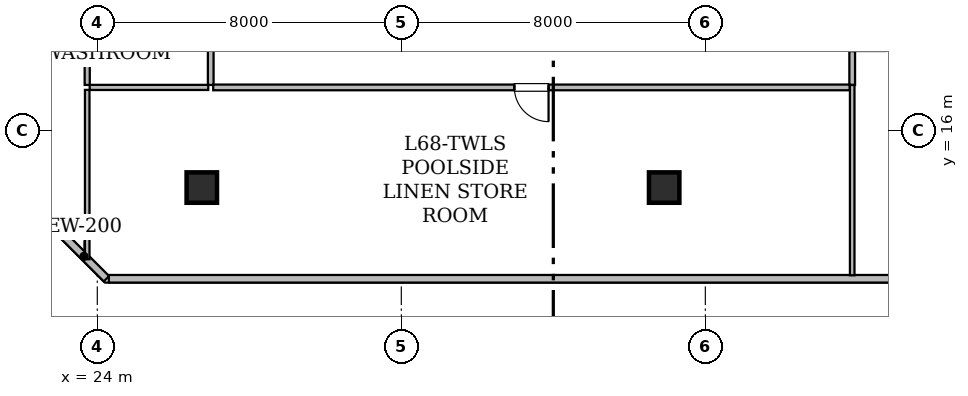
"""IFC4 building model, lengths in metres.
Left out: names, types, materials, properties, quantities, classifications, styles, units other than length and angle.
Written with IfcOpenShell. Run it as: python <this file> out.ifc"""

import sys

from ifc_helpers import new_model, si_unit, direction, frame, frame_2d, origin, origin_2d, place, context, subcontext, project, spatial, rectangle, hollow_rectangle, extrude, element, fill, save


model = new_model("IFC4")
c1 = context("Model", 3, precision=1e-05, world=origin(), true_north=direction((0.0, 1.0)))
c2 = subcontext(c1, "Body", "Model", "MODEL_VIEW")
j1 = project(units=[si_unit("LENGTHUNIT", "METRE"), si_unit("PLANEANGLEUNIT", "RADIAN")], contexts=[c1])
p1 = place(None, origin())
s1 = spatial("IfcSite", under=j1, at=p1, CompositionType="ELEMENT")
p2 = place(p1, origin())
s2 = spatial("IfcBuilding", under=s1, at=p2, CompositionType="ELEMENT")
p3 = place(p2, frame((0.0, 0.0, 264.65)))
s3 = spatial("IfcBuildingStorey", under=s2, at=p3, CompositionType="ELEMENT", Elevation=264.65)
for number, where, z_axis, x_axis in (
    (1, (26.75, 14.5, 0.0), (0.0, 0.0, 1.0), (1.0, 0.0, 0.0)),
    (2, (38.917, 14.5, 0.0), (0.0, 0.0, 1.0), (1.0, 0.0, 0.0)),
):
    element("IfcColumn", number, at=place(p3, frame(where, z_axis=z_axis, x_axis=x_axis)), inside=s3, PredefinedType="COLUMN", context=c2, shape_type="SweptSolid", body=[
        extrude(hollow_rectangle(XDim=0.8, YDim=0.8, WallThickness=0.04, at=origin_2d()), origin(), (0.0, 0.0, 1.0), 4.775),
    ])
p4 = place(p3, frame((24.241, 12.1, 0.0), z_axis=(0.0, 0.0, 1.0), x_axis=(-0.707106781187, 0.707106781187, 0.0)))
e3 = element("IfcWall", 3, at=p4, inside=s3, PredefinedType="STANDARD", context=c2, shape_type="SweptSolid", body=[
    extrude(rectangle(XDim=5.573, YDim=0.2, at=frame_2d((2.787, 0.0))), origin(), (0.0, 0.0, 1.0), 4.38),
])
p5 = place(p3, frame((65.696, 12.1, 0.0), z_axis=(0.0, 0.0, 1.0), x_axis=(-1.0, 0.0, 0.0)))
e4 = element("IfcWall", 4, at=p5, inside=s3, PredefinedType="STANDARD", context=c2, shape_type="SweptSolid", body=[
    extrude(rectangle(XDim=41.393, YDim=0.2, at=frame_2d((20.697, 0.0))), origin(), (0.0, 0.0, 1.0), 4.38),
])
p6 = place(p5, frame((10.408, 0.0, 0.85)))
e5 = element("IfcOpeningElement", 5, at=p6, cuts=e4, PredefinedType="OPENING", context=c2, shape_type="SweptSolid", body=[
    extrude(rectangle(XDim=1.8, YDim=0.92, at=frame_2d((0.9, 0.46))), frame((0.0, 0.11, 0.0), z_axis=(0.0, -1.0, 0.0), x_axis=(1.0, 0.0, 0.0)), (0.0, 0.0, 1.0), 0.22),
])
p7 = place(p3, frame((43.865, 19.886, 0.0), z_axis=(0.0, 0.0, 1.0), x_axis=(0.0, -1.0, 0.0)))
e6 = element("IfcWall", 6, at=p7, inside=s3, PredefinedType="STANDARD", context=c2, shape_type="SweptSolid", body=[
    extrude(rectangle(XDim=2.686, YDim=0.15, at=frame_2d((1.343, 0.0))), origin(), (0.0, 0.0, 1.0), 2.82),
])
p8 = place(p7, frame((0.893, 0.0, 0.0)))
e7 = element("IfcOpeningElement", 7, at=p8, cuts=e6, PredefinedType="OPENING", context=c2, shape_type="SweptSolid", body=[
    extrude(rectangle(XDim=0.9, YDim=2.1, at=frame_2d((0.45, 1.05))), frame((0.0, 0.085, 0.0), z_axis=(0.0, -1.0, 0.0), x_axis=(1.0, 0.0, 0.0)), (0.0, 0.0, 1.0), 0.17),
])
p9 = place(p3, frame((26.985, 17.2, 0.0), z_axis=(0.0, 0.0, 1.0), x_axis=(0.0, 1.0, 0.0)))
e8 = element("IfcWall", 8, at=p9, inside=s3, PredefinedType="STANDARD", context=c2, shape_type="SweptSolid", body=[
    extrude(rectangle(XDim=7.514, YDim=0.15, at=frame_2d((3.757, 0.0))), origin(), (0.0, 0.0, 1.0), 2.82),
])
p10 = place(p9, frame((3.311, 0.0, 0.0)))
e9 = element("IfcOpeningElement", 9, at=p10, cuts=e8, PredefinedType="OPENING", context=c2, shape_type="SweptSolid", body=[
    extrude(rectangle(XDim=0.85, YDim=2.1, at=frame_2d((0.425, 1.05))), frame((0.0, 0.085, 0.0), z_axis=(0.0, -1.0, 0.0), x_axis=(1.0, 0.0, 0.0)), (0.0, 0.0, 1.0), 0.17),
])
p11 = place(p3, frame((43.8, 17.135, 0.0), z_axis=(0.0, 0.0, 1.0), x_axis=(-1.0, 0.0, 0.0)))
e10 = element("IfcWall", 10, at=p11, inside=s3, PredefinedType="STANDARD", context=c2, shape_type="SweptSolid", body=[
    extrude(rectangle(XDim=16.75, YDim=0.15, at=frame_2d((8.375, 0.0))), origin(), (0.0, 0.0, 1.0), 2.82),
])
p12 = place(p11, frame((7.925, 0.0, 0.0)))
e11 = element("IfcOpeningElement", 11, at=p12, cuts=e10, PredefinedType="OPENING", context=c2, shape_type="SweptSolid", body=[
    extrude(rectangle(XDim=0.9, YDim=2.1, at=frame_2d((0.45, 1.05))), frame((0.0, 0.085, 0.0), z_axis=(0.0, -1.0, 0.0), x_axis=(1.0, 0.0, 0.0)), (0.0, 0.0, 1.0), 0.17),
])
p13 = place(p3, frame((43.865, 12.192, 0.0), z_axis=(0.0, 0.0, 1.0), x_axis=(0.0, 1.0, 0.0)))
e12 = element("IfcWall", 12, at=p13, inside=s3, PredefinedType="PARTITIONING", context=c2, shape_type="SweptSolid", body=[
    extrude(rectangle(XDim=5.008, YDim=0.12, at=frame_2d((2.504, 0.0))), origin(), (0.0, 0.0, 1.0), 2.82),
])
p14 = place(p3, frame((26.92, 17.135, 0.0), z_axis=(0.0, 0.0, 1.0), x_axis=(-1.0, 0.0, 0.0)))
e13 = element("IfcWall", 13, at=p14, inside=s3, PredefinedType="PARTITIONING", context=c2, shape_type="SweptSolid", body=[
    extrude(rectangle(XDim=3.12, YDim=0.135, at=frame_2d((1.56, 0.0))), origin(), (0.0, 0.0, 1.0), 2.82),
])
p15 = place(p3, frame((23.735, 17.2, 0.0), z_axis=(0.0, 0.0, 1.0), x_axis=(0.0, 1.0, 0.0)))
e14 = element("IfcWall", 14, at=p15, inside=s3, PredefinedType="PARTITIONING", context=c2, shape_type="SweptSolid", body=[
    extrude(rectangle(XDim=7.2, YDim=0.135, at=frame_2d((3.6, 0.0))), origin(), (0.0, 0.0, 1.0), 2.82),
])
p16 = place(p3, frame((23.735, 12.613, 0.0), z_axis=(0.0, 0.0, 1.0), x_axis=(0.0, 1.0, 0.0)))
e15 = element("IfcWall", 15, at=p16, inside=s3, PredefinedType="PARTITIONING", context=c2, shape_type="SweptSolid", body=[
    extrude(rectangle(XDim=4.457, YDim=0.12, at=frame_2d((2.229, 0.0))), origin(), (0.0, 0.0, 1.0), 4.38),
])
p17 = place(p12, origin())
e16 = element("IfcDoor", 16, at=p17, inside=s3, OperationType="SINGLE_SWING_LEFT", PredefinedType="DOOR", context=c2, shape_type="SweptSolid", body=[
    extrude(rectangle(XDim=0.9, YDim=2.1, at=frame_2d((0.45, 1.05))), frame((0.0, 0.025, 0.0), z_axis=(0.0, -1.0, 0.0), x_axis=(1.0, 0.0, 0.0)), (0.0, 0.0, 1.0), 0.05),
])
fill(e11, e16)
save(model, sys.argv[1])
